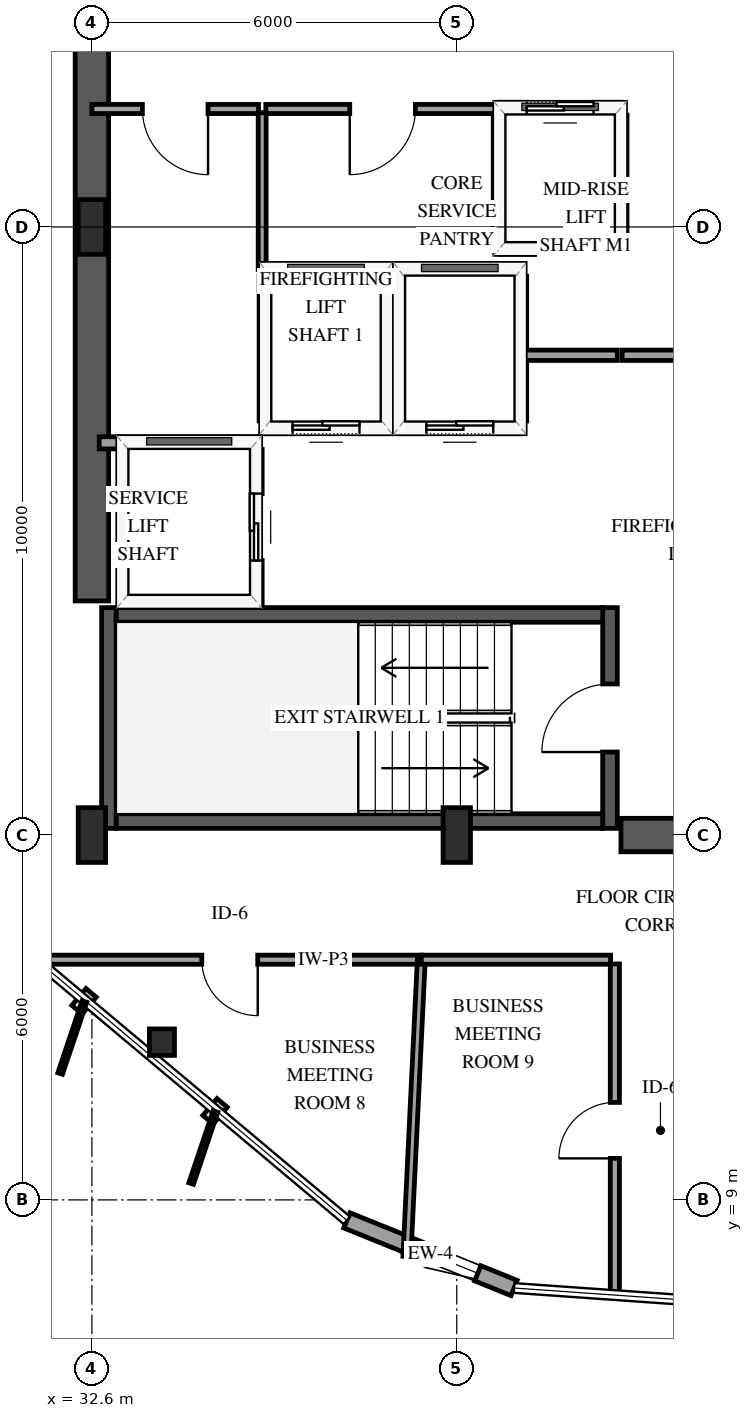
"""IFC4 building model, lengths in metres.
Left out: names, types, materials, properties, quantities, classifications, styles, units other than length and angle.
Written with IfcOpenShell. Run it as: python <this file> out.ifc"""

import sys

from ifc_helpers import new_model, si_unit, direction, frame, frame_2d, origin, origin_2d, place, context, subcontext, project, spatial, rectangle, i_section, extrude, element, fill, save


model = new_model("IFC4")
c1 = context("Model", 3, precision=1e-05, world=origin(), true_north=direction((0.0, 1.0)))
c2 = subcontext(c1, "Body", "Model", "MODEL_VIEW")
j1 = project(units=[si_unit("LENGTHUNIT", "METRE"), si_unit("PLANEANGLEUNIT", "RADIAN")], contexts=[c1])
p1 = place(None, origin())
s1 = spatial("IfcSite", under=j1, at=p1, CompositionType="ELEMENT")
p2 = place(p1, origin())
s2 = spatial("IfcBuilding", under=s1, at=p2, CompositionType="ELEMENT")
p3 = place(p2, frame((0.0, 0.0, 157.0)))
s3 = spatial("IfcBuildingStorey", under=s2, at=p3, CompositionType="ELEMENT", Elevation=157.0)
p4 = place(p3, frame((32.88, 15.11, 0.0), z_axis=(0.0, 0.0, 1.0), x_axis=(0.0, 1.0, 0.0)))
e1 = element("IfcWall", 1, at=p4, inside=s3, PredefinedType="SHEAR", context=c2, shape_type="SweptSolid", body=[
    extrude(rectangle(XDim=3.63, YDim=0.24, at=frame_2d((1.815, 0.0))), origin(), (0.0, 0.0, 1.0), 3.6),
])
p5 = place(p3, frame((41.12, 15.11, 0.0), z_axis=(0.0, 0.0, 1.0), x_axis=(0.0, 1.0, 0.0)))
e2 = element("IfcWall", 2, at=p5, inside=s3, PredefinedType="SHEAR", context=c2, shape_type="SweptSolid", body=[
    extrude(rectangle(XDim=3.63, YDim=0.24, at=frame_2d((1.815, 0.0))), origin(), (0.0, 0.0, 1.0), 3.6),
])
p6 = place(p5, frame((1.255, 0.0, 0.0)))
e3 = element("IfcOpeningElement", 3, at=p6, cuts=e2, PredefinedType="OPENING", context=c2, shape_type="SweptSolid", body=[
    extrude(rectangle(XDim=1.12, YDim=2.15, at=frame_2d((0.56, 1.075))), frame((0.0, 0.13, 0.0), z_axis=(0.0, -1.0, 0.0), x_axis=(1.0, 0.0, 0.0)), (0.0, 0.0, 1.0), 0.26),
])
for number, where, z_axis, x_axis in (
    (4, (33.0, 15.23, 0.0), (0.0, 0.0, 1.0), (1.0, 0.0, 0.0)),
    (5, (33.0, 18.62, 0.0), (0.0, 0.0, 1.0), (1.0, 0.0, 0.0)),
):
    element("IfcWall", number, at=place(p3, frame(where, z_axis=z_axis, x_axis=x_axis)), inside=s3, PredefinedType="SHEAR", context=c2, shape_type="SweptSolid", body=[
        extrude(rectangle(XDim=8.0, YDim=0.24, at=frame_2d((4.0, 0.0))), origin(), (0.0, 0.0, 1.0), 3.6),
    ])
p7 = place(p3, frame((32.6, 18.85, 0.0), z_axis=(0.0, 0.0, 1.0), x_axis=(0.0, 1.0, 0.0)))
e6 = element("IfcWall", 6, at=p7, inside=s3, PredefinedType="SHEAR", context=c2, shape_type="SweptSolid", body=[
    extrude(rectangle(XDim=12.3, YDim=0.55, at=frame_2d((6.15, 0.0))), origin(), (0.0, 0.0, 1.0), 3.6),
])
p8 = place(p3, frame((41.3, 15.0, 0.0), z_axis=(0.0, 0.0, 1.0), x_axis=(1.0, 0.0, 0.0)))
e7 = element("IfcWall", 7, at=p8, inside=s3, PredefinedType="SHEAR", context=c2, shape_type="SweptSolid", body=[
    extrude(rectangle(XDim=2.85, YDim=0.55, at=frame_2d((1.425, 0.0))), origin(), (0.0, 0.0, 1.0), 3.6),
])
for number, where, z_axis, x_axis in (
    (8, (32.6, 15.0, 0.0), (0.0, 0.0, 1.0), (1.0, 0.0, 0.0)),
    (9, (32.6, 25.0, 0.0), (0.0, 0.0, 1.0), (1.0, 0.0, 0.0)),
    (10, (38.6, 15.0, 0.0), (0.0, 0.0, 1.0), (1.0, 0.0, 0.0)),
):
    element("IfcColumn", number, at=place(p3, frame(where, z_axis=z_axis, x_axis=x_axis)), inside=s3, PredefinedType="PILASTER", context=c2, shape_type="SweptSolid", body=[
        extrude(rectangle(XDim=0.45, YDim=0.9, at=origin_2d()), origin(), (0.0, 0.0, 1.0), 3.6),
    ])
p9 = place(p3, frame((33.751, 11.594, 0.0), z_axis=(0.0, 0.0, 1.0), x_axis=(1.0, 0.0, 0.0)))
e11 = element("IfcColumn", 11, at=p9, inside=s3, PredefinedType="COLUMN", context=c2, shape_type="SweptSolid", body=[
    extrude(i_section(OverallWidth=0.412, OverallDepth=0.435, WebThickness=0.036, FlangeThickness=0.057, FilletRadius=0.038, at=origin_2d()), origin(), (0.0, 0.0, 1.0), 3.6),
])
p10 = place(p3, frame((36.793, 8.663, 0.0), z_axis=(0.0, 0.0, 1.0), x_axis=(0.927079641451, -0.374864426703, 0.0)))
e12 = element("IfcWall", 12, at=p10, inside=s3, PredefinedType="SOLIDWALL", context=c2, shape_type="SweptSolid", body=[
    extrude(rectangle(XDim=2.967, YDim=0.27, at=frame_2d((1.483, 0.0))), origin(), (0.0, 0.0, 1.0), 2.679),
])
p11 = place(p10, frame((1.422, 0.0, 0.75)))
e13 = element("IfcOpeningElement", 13, at=p11, cuts=e12, PredefinedType="OPENING", context=c2, shape_type="SweptSolid", body=[
    extrude(rectangle(XDim=0.9, YDim=1.5, at=frame_2d((0.45, 0.75))), frame((0.0, 0.145, 0.0), z_axis=(0.0, -1.0, 0.0), x_axis=(1.0, 0.0, 0.0)), (0.0, 0.0, 1.0), 0.29),
])
p12 = place(p3, frame((35.45, 21.7, 0.0), z_axis=(0.0, 0.0, 1.0), x_axis=(1.0, 0.0, 0.0)))
e14 = element("IfcWall", 14, at=p12, inside=s3, PredefinedType="SOLIDWALL", context=c2, shape_type="SweptSolid", body=[
    extrude(rectangle(XDim=2.0, YDim=0.2, at=frame_2d((1.0, 0.0))), origin(), (0.0, 0.0, 1.0), 3.3),
])
p13 = place(p12, frame((0.45, 0.0, 0.0)))
e15 = element("IfcOpeningElement", 15, at=p13, cuts=e14, PredefinedType="OPENING", context=c2, shape_type="SweptSolid", body=[
    extrude(rectangle(XDim=1.1, YDim=2.15, at=frame_2d((0.55, 1.075))), frame((0.0, 0.11, 0.0), z_axis=(0.0, -1.0, 0.0), x_axis=(1.0, 0.0, 0.0)), (0.0, 0.0, 1.0), 0.22),
])
p14 = place(p3, frame((35.45, 24.3, 0.0), z_axis=(0.0, 0.0, 1.0), x_axis=(1.0, 0.0, 0.0)))
e16 = element("IfcWall", 16, at=p14, inside=s3, PredefinedType="SOLIDWALL", context=c2, shape_type="SweptSolid", body=[
    extrude(rectangle(XDim=2.0, YDim=0.2, at=frame_2d((1.0, 0.0))), origin(), (0.0, 0.0, 1.0), 3.3),
])
for number, where, z_axis, x_axis in (
    (17, (35.45, 21.81, 0.0), (0.0, 0.0, 1.0), (0.0, 1.0, 0.0)),
    (18, (37.45, 21.81, 0.0), (0.0, 0.0, 1.0), (0.0, 1.0, 0.0)),
):
    element("IfcWall", number, at=place(p3, frame(where, z_axis=z_axis, x_axis=x_axis)), inside=s3, PredefinedType="SOLIDWALL", context=c2, shape_type="SweptSolid", body=[
        extrude(rectangle(XDim=2.38, YDim=0.2, at=frame_2d((1.19, 0.0))), origin(), (0.0, 0.0, 1.0), 3.3),
    ])
p15 = place(p3, frame((37.65, 21.7, 0.0), z_axis=(0.0, 0.0, 1.0), x_axis=(1.0, 0.0, 0.0)))
e19 = element("IfcWall", 19, at=p15, inside=s3, PredefinedType="SOLIDWALL", context=c2, shape_type="SweptSolid", body=[
    extrude(rectangle(XDim=2.0, YDim=0.2, at=frame_2d((1.0, 0.0))), origin(), (0.0, 0.0, 1.0), 3.3),
])
p16 = place(p15, frame((0.45, 0.0, 0.0)))
e20 = element("IfcOpeningElement", 20, at=p16, cuts=e19, PredefinedType="OPENING", context=c2, shape_type="SweptSolid", body=[
    extrude(rectangle(XDim=1.1, YDim=2.15, at=frame_2d((0.55, 1.075))), frame((0.0, 0.11, 0.0), z_axis=(0.0, -1.0, 0.0), x_axis=(1.0, 0.0, 0.0)), (0.0, 0.0, 1.0), 0.22),
])
p17 = place(p3, frame((37.65, 24.3, 0.0), z_axis=(0.0, 0.0, 1.0), x_axis=(1.0, 0.0, 0.0)))
e21 = element("IfcWall", 21, at=p17, inside=s3, PredefinedType="SOLIDWALL", context=c2, shape_type="SweptSolid", body=[
    extrude(rectangle(XDim=2.0, YDim=0.2, at=frame_2d((1.0, 0.0))), origin(), (0.0, 0.0, 1.0), 3.3),
])
p18 = place(p3, frame((39.65, 21.81, 0.0), z_axis=(0.0, 0.0, 1.0), x_axis=(0.0, 1.0, 0.0)))
e22 = element("IfcWall", 22, at=p18, inside=s3, PredefinedType="SOLIDWALL", context=c2, shape_type="SweptSolid", body=[
    extrude(rectangle(XDim=2.38, YDim=0.2, at=frame_2d((1.19, 0.0))), origin(), (0.0, 0.0, 1.0), 3.3),
])
p19 = place(p3, frame((32.72, 21.45, 0.0), z_axis=(0.0, 0.0, 1.0), x_axis=(1.0, 0.0, 0.0)))
e23 = element("IfcWall", 23, at=p19, inside=s3, PredefinedType="SOLIDWALL", context=c2, shape_type="SweptSolid", body=[
    extrude(rectangle(XDim=2.58, YDim=0.2, at=frame_2d((1.29, 0.0))), origin(), (0.0, 0.0, 1.0), 3.3),
])
p20 = place(p3, frame((35.3, 18.79, 0.0), z_axis=(0.0, 0.0, 1.0), x_axis=(0.0, 1.0, 0.0)))
e24 = element("IfcWall", 24, at=p20, inside=s3, PredefinedType="SOLIDWALL", context=c2, shape_type="SweptSolid", body=[
    extrude(rectangle(XDim=2.55, YDim=0.2, at=frame_2d((1.275, 0.0))), origin(), (0.0, 0.0, 1.0), 3.3),
])
p21 = place(p20, frame((0.725, 0.0, 0.0)))
e25 = element("IfcOpeningElement", 25, at=p21, cuts=e24, PredefinedType="OPENING", context=c2, shape_type="SweptSolid", body=[
    extrude(rectangle(XDim=1.1, YDim=2.15, at=frame_2d((0.55, 1.075))), frame((0.0, 0.11, 0.0), z_axis=(0.0, -1.0, 0.0), x_axis=(1.0, 0.0, 0.0)), (0.0, 0.0, 1.0), 0.22),
])
p22 = place(p3, frame((39.3, 24.65, 0.0), z_axis=(0.0, 0.0, 1.0), x_axis=(1.0, 0.0, 0.0)))
e26 = element("IfcWall", 26, at=p22, inside=s3, PredefinedType="SOLIDWALL", context=c2, shape_type="SweptSolid", body=[
    extrude(rectangle(XDim=2.0, YDim=0.2, at=frame_2d((1.0, 0.0))), origin(), (0.0, 0.0, 1.0), 3.3),
])
p23 = place(p3, frame((39.3, 26.95, 0.0), z_axis=(0.0, 0.0, 1.0), x_axis=(1.0, 0.0, 0.0)))
e27 = element("IfcWall", 27, at=p23, inside=s3, PredefinedType="SOLIDWALL", context=c2, shape_type="SweptSolid", body=[
    extrude(rectangle(XDim=2.0, YDim=0.2, at=frame_2d((1.0, 0.0))), origin(), (0.0, 0.0, 1.0), 3.3),
])
p24 = place(p23, frame((0.45, 0.0, 0.0)))
e28 = element("IfcOpeningElement", 28, at=p24, cuts=e27, PredefinedType="OPENING", context=c2, shape_type="SweptSolid", body=[
    extrude(rectangle(XDim=1.1, YDim=2.15, at=frame_2d((0.55, 1.075))), frame((0.0, 0.11, 0.0), z_axis=(0.0, -1.0, 0.0), x_axis=(1.0, 0.0, 0.0)), (0.0, 0.0, 1.0), 0.22),
])
for number, where, z_axis, x_axis in (
    (29, (39.3, 24.76, 0.0), (0.0, 0.0, 1.0), (0.0, 1.0, 0.0)),
    (30, (41.3, 24.76, 0.0), (0.0, 0.0, 1.0), (0.0, 1.0, 0.0)),
):
    element("IfcWall", number, at=place(p3, frame(where, z_axis=z_axis, x_axis=x_axis)), inside=s3, PredefinedType="SOLIDWALL", context=c2, shape_type="SweptSolid", body=[
        extrude(rectangle(XDim=2.08, YDim=0.2, at=frame_2d((1.04, 0.0))), origin(), (0.0, 0.0, 1.0), 3.3),
    ])
p25 = place(p3, frame((38.017, 12.95, 0.0), z_axis=(0.0, 0.0, 1.0), x_axis=(-1.0, 0.0, 0.0)))
e31 = element("IfcWall", 31, at=p25, inside=s3, PredefinedType="PARTITIONING", context=c2, shape_type="SweptSolid", body=[
    extrude(rectangle(XDim=6.329, YDim=0.15, at=frame_2d((3.165, 0.0))), origin(), (0.0, 0.0, 1.0), 3.3),
])
p26 = place(p25, frame((2.69, 0.0, 0.0)))
e32 = element("IfcOpeningElement", 32, at=p26, cuts=e31, PredefinedType="OPENING", context=c2, shape_type="SweptSolid", body=[
    extrude(rectangle(XDim=0.92, YDim=2.12, at=frame_2d((0.46, 1.06))), frame((0.0, 0.085, 0.0), z_axis=(0.0, -1.0, 0.0), x_axis=(1.0, 0.0, 0.0)), (0.0, 0.0, 1.0), 0.17),
])
p27 = place(p3, frame((41.2, 7.435, 0.0), z_axis=(0.0, 0.0, 1.0), x_axis=(0.0, 1.0, 0.0)))
e33 = element("IfcWall", 33, at=p27, inside=s3, PredefinedType="PARTITIONING", context=c2, shape_type="SweptSolid", body=[
    extrude(rectangle(XDim=5.445, YDim=0.15, at=frame_2d((2.722, 0.0))), origin(), (0.0, 0.0, 1.0), 3.3),
])
p28 = place(p27, frame((2.248, 0.0, 0.0)))
e34 = element("IfcOpeningElement", 34, at=p28, cuts=e33, PredefinedType="OPENING", context=c2, shape_type="SweptSolid", body=[
    extrude(rectangle(XDim=0.92, YDim=2.12, at=frame_2d((0.46, 1.06))), frame((0.0, 0.085, 0.0), z_axis=(0.0, -1.0, 0.0), x_axis=(1.0, 0.0, 0.0)), (0.0, 0.0, 1.0), 0.17),
])
p29 = place(p3, frame((38.017, 12.95, 0.0), z_axis=(0.0, 0.0, 1.0), x_axis=(-0.048521926966, -0.998822117598, 0.0)))
e35 = element("IfcWall", 35, at=p29, inside=s3, PredefinedType="PARTITIONING", context=c2, shape_type="SweptSolid", body=[
    extrude(rectangle(XDim=4.886, YDim=0.13, at=frame_2d((2.443, 0.0))), origin(), (0.0, 0.0, 1.0), 2.678),
])
p30 = place(p3, frame((39.3, 26.94, 0.0), z_axis=(0.0, 0.0, 1.0), x_axis=(-1.0, 0.0, 0.0)))
e36 = element("IfcWall", 36, at=p30, inside=s3, PredefinedType="PARTITIONING", context=c2, shape_type="SweptSolid", body=[
    extrude(rectangle(XDim=3.84, YDim=0.15, at=frame_2d((1.92, 0.0))), origin(), (0.0, 0.0, 1.0), 3.3),
])
p31 = place(p30, frame((1.38, 0.0, 0.0)))
e37 = element("IfcOpeningElement", 37, at=p31, cuts=e36, PredefinedType="OPENING", context=c2, shape_type="SweptSolid", body=[
    extrude(rectangle(XDim=1.08, YDim=2.15, at=frame_2d((0.54, 1.075))), frame((0.0, 0.085, 0.0), z_axis=(0.0, -1.0, 0.0), x_axis=(1.0, 0.0, 0.0)), (0.0, 0.0, 1.0), 0.17),
])
p32 = place(p3, frame((41.32, 22.89, 0.0), z_axis=(0.0, 0.0, 1.0), x_axis=(1.0, 0.0, 0.0)))
e38 = element("IfcWall", 38, at=p32, inside=s3, PredefinedType="PARTITIONING", context=c2, shape_type="SweptSolid", body=[
    extrude(rectangle(XDim=3.24, YDim=0.17, at=frame_2d((1.62, 0.0))), origin(), (0.0, 0.0, 1.0), 3.3),
])
p33 = place(p32, frame((1.08, 0.0, 0.0)))
e39 = element("IfcOpeningElement", 39, at=p33, cuts=e38, PredefinedType="OPENING", context=c2, shape_type="SweptSolid", body=[
    extrude(rectangle(XDim=1.08, YDim=2.15, at=frame_2d((0.54, 1.075))), frame((0.0, 0.095, 0.0), z_axis=(0.0, -1.0, 0.0), x_axis=(1.0, 0.0, 0.0)), (0.0, 0.0, 1.0), 0.19),
])
p34 = place(p3, frame((41.13, 12.95, 0.0), z_axis=(0.0, 0.0, 1.0), x_axis=(-1.0, 0.0, 0.0)))
e40 = element("IfcWall", 40, at=p34, inside=s3, PredefinedType="PARTITIONING", context=c2, shape_type="SweptSolid", body=[
    extrude(rectangle(XDim=3.113, YDim=0.15, at=frame_2d((1.556, 0.0))), origin(), (0.0, 0.0, 1.0), 3.3),
])
p35 = place(p3, frame((35.34, 26.94, 0.0), z_axis=(0.0, 0.0, 1.0), x_axis=(-1.0, 0.0, 0.0)))
e41 = element("IfcWall", 41, at=p35, inside=s3, PredefinedType="PARTITIONING", context=c2, shape_type="SweptSolid", body=[
    extrude(rectangle(XDim=2.74, YDim=0.15, at=frame_2d((1.37, 0.0))), origin(), (0.0, 0.0, 1.0), 3.3),
])
p36 = place(p35, frame((0.83, 0.0, 0.0)))
e42 = element("IfcOpeningElement", 42, at=p36, cuts=e41, PredefinedType="OPENING", context=c2, shape_type="SweptSolid", body=[
    extrude(rectangle(XDim=1.08, YDim=2.15, at=frame_2d((0.54, 1.075))), frame((0.0, 0.085, 0.0), z_axis=(0.0, -1.0, 0.0), x_axis=(1.0, 0.0, 0.0)), (0.0, 0.0, 1.0), 0.17),
])
p37 = place(p3, frame((35.4, 26.88, 0.0), z_axis=(0.0, 0.0, 1.0), x_axis=(0.0, -1.0, 0.0)))
e43 = element("IfcWall", 43, at=p37, inside=s3, PredefinedType="PARTITIONING", context=c2, shape_type="SweptSolid", body=[
    extrude(rectangle(XDim=2.58, YDim=0.13, at=frame_2d((1.29, 0.0))), origin(), (0.0, 0.0, 1.0), 3.3),
])
p38 = place(p3, frame((39.72, 22.89, 0.0), z_axis=(0.0, 0.0, 1.0), x_axis=(1.0, 0.0, 0.0)))
e44 = element("IfcWall", 44, at=p38, inside=s3, PredefinedType="PARTITIONING", context=c2, shape_type="SweptSolid", body=[
    extrude(rectangle(XDim=1.52, YDim=0.17, at=frame_2d((0.76, 0.0))), origin(), (0.0, 0.0, 1.0), 3.3),
])
p39 = place(p11, origin())
e45 = element("IfcWindow", 45, at=p39, inside=s3, PartitioningType="SINGLE_PANEL", PredefinedType="WINDOW", context=c2, shape_type="SweptSolid", body=[
    extrude(rectangle(XDim=0.9, YDim=1.5, at=frame_2d((0.45, 0.75))), frame((0.0, 0.03, 0.0), z_axis=(0.0, -1.0, 0.0), x_axis=(1.0, 0.0, 0.0)), (0.0, 0.0, 1.0), 0.06),
])
fill(e13, e45)
p40 = place(p13, origin())
e46 = element("IfcDoor", 46, at=p40, inside=s3, OperationType="SLIDING_TO_LEFT", PredefinedType="DOOR", context=c2, shape_type="SweptSolid", body=[
    extrude(rectangle(XDim=1.1, YDim=2.15, at=frame_2d((0.55, 1.075))), frame((0.0, 0.025, 0.0), z_axis=(0.0, -1.0, 0.0), x_axis=(1.0, 0.0, 0.0)), (0.0, 0.0, 1.0), 0.05),
])
fill(e15, e46)
p41 = place(p16, origin())
e47 = element("IfcDoor", 47, at=p41, inside=s3, OperationType="SLIDING_TO_LEFT", PredefinedType="DOOR", context=c2, shape_type="SweptSolid", body=[
    extrude(rectangle(XDim=1.1, YDim=2.15, at=frame_2d((0.55, 1.075))), frame((0.0, 0.025, 0.0), z_axis=(0.0, -1.0, 0.0), x_axis=(1.0, 0.0, 0.0)), (0.0, 0.0, 1.0), 0.05),
])
fill(e20, e47)
p42 = place(p21, origin())
e48 = element("IfcDoor", 48, at=p42, inside=s3, OperationType="SLIDING_TO_LEFT", PredefinedType="DOOR", context=c2, shape_type="SweptSolid", body=[
    extrude(rectangle(XDim=1.1, YDim=2.15, at=frame_2d((0.55, 1.075))), frame((0.0, 0.025, 0.0), z_axis=(0.0, -1.0, 0.0), x_axis=(1.0, 0.0, 0.0)), (0.0, 0.0, 1.0), 0.05),
])
fill(e25, e48)
p43 = place(p24, origin())
e49 = element("IfcDoor", 49, at=p43, inside=s3, OperationType="SLIDING_TO_LEFT", PredefinedType="DOOR", context=c2, shape_type="SweptSolid", body=[
    extrude(rectangle(XDim=1.1, YDim=2.15, at=frame_2d((0.55, 1.075))), frame((0.0, 0.025, 0.0), z_axis=(0.0, -1.0, 0.0), x_axis=(1.0, 0.0, 0.0)), (0.0, 0.0, 1.0), 0.05),
])
fill(e28, e49)
p44 = place(p6, origin())
e50 = element("IfcDoor", 50, at=p44, inside=s3, OperationType="SINGLE_SWING_LEFT", PredefinedType="DOOR", context=c2, shape_type="SweptSolid", body=[
    extrude(rectangle(XDim=1.12, YDim=2.15, at=frame_2d((0.56, 1.075))), frame((0.0, 0.025, 0.0), z_axis=(0.0, -1.0, 0.0), x_axis=(1.0, 0.0, 0.0)), (0.0, 0.0, 1.0), 0.05),
])
fill(e3, e50)
p45 = place(p26, origin())
e51 = element("IfcDoor", 51, at=p45, inside=s3, OperationType="SINGLE_SWING_LEFT", PredefinedType="DOOR", context=c2, shape_type="SweptSolid", body=[
    extrude(rectangle(XDim=0.92, YDim=2.12, at=frame_2d((0.46, 1.06))), frame((0.0, 0.025, 0.0), z_axis=(0.0, -1.0, 0.0), x_axis=(1.0, 0.0, 0.0)), (0.0, 0.0, 1.0), 0.05),
])
fill(e32, e51)
p46 = place(p28, origin())
e52 = element("IfcDoor", 52, at=p46, inside=s3, OperationType="SINGLE_SWING_LEFT", PredefinedType="DOOR", context=c2, shape_type="SweptSolid", body=[
    extrude(rectangle(XDim=0.92, YDim=2.12, at=frame_2d((0.46, 1.06))), frame((0.0, 0.025, 0.0), z_axis=(0.0, -1.0, 0.0), x_axis=(1.0, 0.0, 0.0)), (0.0, 0.0, 1.0), 0.05),
])
fill(e34, e52)
p47 = place(p31, origin())
e53 = element("IfcDoor", 53, at=p47, inside=s3, OperationType="SINGLE_SWING_RIGHT", PredefinedType="DOOR", context=c2, shape_type="SweptSolid", body=[
    extrude(rectangle(XDim=1.08, YDim=2.15, at=frame_2d((0.54, 1.075))), frame((0.0, 0.025, 0.0), z_axis=(0.0, -1.0, 0.0), x_axis=(1.0, 0.0, 0.0)), (0.0, 0.0, 1.0), 0.05),
])
fill(e37, e53)
p48 = place(p36, origin())
e54 = element("IfcDoor", 54, at=p48, inside=s3, OperationType="SINGLE_SWING_LEFT", PredefinedType="DOOR", context=c2, shape_type="SweptSolid", body=[
    extrude(rectangle(XDim=1.08, YDim=2.15, at=frame_2d((0.54, 1.075))), frame((0.0, 0.025, 0.0), z_axis=(0.0, -1.0, 0.0), x_axis=(1.0, 0.0, 0.0)), (0.0, 0.0, 1.0), 0.05),
])
fill(e42, e54)
save(model, sys.argv[1])
